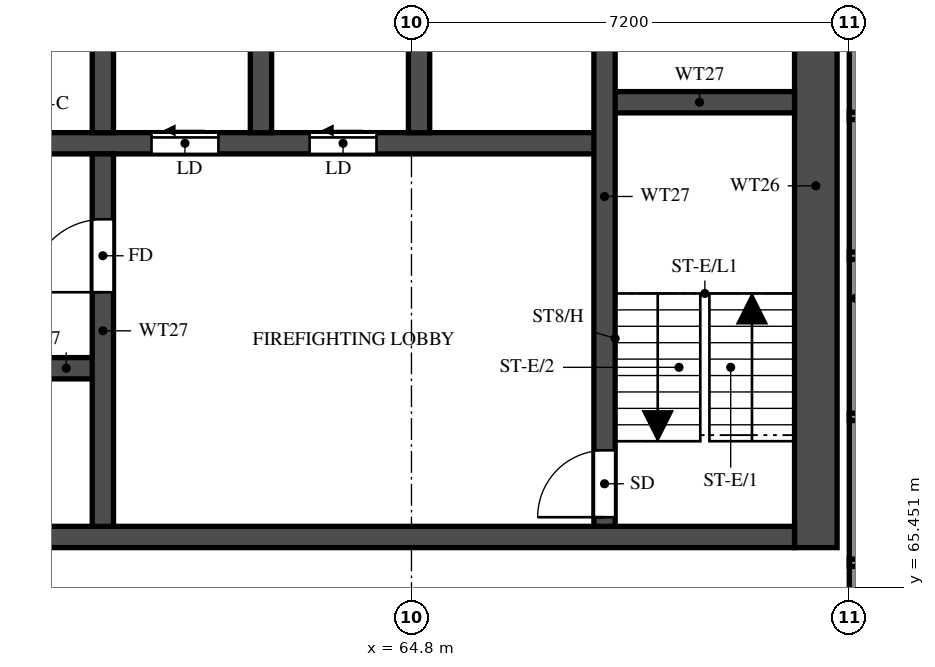
"""IFC4 building model, lengths in metres.
Left out: names, types, materials, properties, quantities, classifications, styles, units other than length and angle.
Written with IfcOpenShell. Run it as: python <this file> out.ifc"""

import sys

from ifc_helpers import new_model, si_unit, direction, frame, frame_2d, origin, place, context, subcontext, project, spatial, rectangle, extrude, element, fill, save


model = new_model("IFC4")
c1 = context("Model", 3, precision=1e-05, world=origin(), true_north=direction((0.0, 1.0)))
c2 = subcontext(c1, "Body", "Model", "MODEL_VIEW")
j1 = project(units=[si_unit("LENGTHUNIT", "METRE"), si_unit("PLANEANGLEUNIT", "RADIAN")], contexts=[c1])
p1 = place(None, origin())
s1 = spatial("IfcSite", under=j1, at=p1, CompositionType="ELEMENT")
p2 = place(p1, origin())
s2 = spatial("IfcBuilding", under=s1, at=p2, CompositionType="ELEMENT")
p3 = place(p2, frame((0.0, 0.0, 146.5)))
s3 = spatial("IfcBuildingStorey", under=s2, at=p3, CompositionType="ELEMENT", Elevation=146.5)
p4 = place(p3, frame((71.45, 66.1, 0.0), z_axis=(0.0, 0.0, 1.0), x_axis=(0.0, 1.0, 0.0)))
e1 = element("IfcWall", 1, at=p4, inside=s3, PredefinedType="SHEAR", context=c2, shape_type="SweptSolid", body=[
    extrude(rectangle(XDim=11.9, YDim=0.7, at=frame_2d((5.95, 0.0))), origin(), (0.0, 0.0, 1.0), 3.2),
])
p5 = place(p3, frame((29.7, 66.275, 0.0), z_axis=(0.0, 0.0, 1.0), x_axis=(1.0, 0.0, 0.0)))
e2 = element("IfcWall", 2, at=p5, inside=s3, PredefinedType="SHEAR", context=c2, shape_type="SweptSolid", body=[
    extrude(rectangle(XDim=41.4, YDim=0.35, at=frame_2d((20.7, 0.0))), origin(), (0.0, 0.0, 1.0), 3.2),
])
p6 = place(p5, frame((0.925, 0.0, 0.0)))
e3 = element("IfcOpeningElement", 3, at=p6, cuts=e2, PredefinedType="OPENING", context=c2, shape_type="SweptSolid", body=[
    extrude(rectangle(XDim=1.1, YDim=2.1, at=frame_2d((0.55, 1.05))), frame((0.0, 0.185, 0.0), z_axis=(0.0, -1.0, 0.0), x_axis=(1.0, 0.0, 0.0)), (0.0, 0.0, 1.0), 0.37),
])
p7 = place(p5, frame((3.712, 0.0, 0.0)))
e4 = element("IfcOpeningElement", 4, at=p7, cuts=e2, PredefinedType="OPENING", context=c2, shape_type="SweptSolid", body=[
    extrude(rectangle(XDim=1.8, YDim=2.1, at=frame_2d((0.9, 1.05))), frame((0.0, 0.185, 0.0), z_axis=(0.0, -1.0, 0.0), x_axis=(1.0, 0.0, 0.0)), (0.0, 0.0, 1.0), 0.37),
])
p8 = place(p3, frame((35.625, 69.05, 0.0), z_axis=(0.0, 0.0, 1.0), x_axis=(1.0, 0.0, 0.0)))
e5 = element("IfcWall", 5, at=p8, inside=s3, PredefinedType="SHEAR", context=c2, shape_type="SweptSolid", body=[
    extrude(rectangle(XDim=24.1, YDim=0.35, at=frame_2d((12.05, 0.0))), origin(), (0.0, 0.0, 1.0), 3.2),
])
p9 = place(p8, frame((1.0, 0.0, 0.0)))
e6 = element("IfcOpeningElement", 6, at=p9, cuts=e5, PredefinedType="OPENING", context=c2, shape_type="SweptSolid", body=[
    extrude(rectangle(XDim=1.1, YDim=2.1, at=frame_2d((0.55, 1.05))), frame((0.0, 0.185, 0.0), z_axis=(0.0, -1.0, 0.0), x_axis=(1.0, 0.0, 0.0)), (0.0, 0.0, 1.0), 0.37),
])
p10 = place(p8, frame((3.75, 0.0, 0.0)))
e7 = element("IfcOpeningElement", 7, at=p10, cuts=e5, PredefinedType="OPENING", context=c2, shape_type="SweptSolid", body=[
    extrude(rectangle(XDim=1.1, YDim=2.1, at=frame_2d((0.55, 1.05))), frame((0.0, 0.185, 0.0), z_axis=(0.0, -1.0, 0.0), x_axis=(1.0, 0.0, 0.0)), (0.0, 0.0, 1.0), 0.37),
])
p11 = place(p8, frame((6.5, 0.0, 0.0)))
e8 = element("IfcOpeningElement", 8, at=p11, cuts=e5, PredefinedType="OPENING", context=c2, shape_type="SweptSolid", body=[
    extrude(rectangle(XDim=1.1, YDim=2.1, at=frame_2d((0.55, 1.05))), frame((0.0, 0.185, 0.0), z_axis=(0.0, -1.0, 0.0), x_axis=(1.0, 0.0, 0.0)), (0.0, 0.0, 1.0), 0.37),
])
p12 = place(p8, frame((9.25, 0.0, 0.0)))
e9 = element("IfcOpeningElement", 9, at=p12, cuts=e5, PredefinedType="OPENING", context=c2, shape_type="SweptSolid", body=[
    extrude(rectangle(XDim=1.1, YDim=2.1, at=frame_2d((0.55, 1.05))), frame((0.0, 0.185, 0.0), z_axis=(0.0, -1.0, 0.0), x_axis=(1.0, 0.0, 0.0)), (0.0, 0.0, 1.0), 0.37),
])
p13 = place(p8, frame((12.0, 0.0, 0.0)))
e10 = element("IfcOpeningElement", 10, at=p13, cuts=e5, PredefinedType="OPENING", context=c2, shape_type="SweptSolid", body=[
    extrude(rectangle(XDim=1.1, YDim=2.1, at=frame_2d((0.55, 1.05))), frame((0.0, 0.185, 0.0), z_axis=(0.0, -1.0, 0.0), x_axis=(1.0, 0.0, 0.0)), (0.0, 0.0, 1.0), 0.37),
])
p14 = place(p8, frame((14.75, 0.0, 0.0)))
e11 = element("IfcOpeningElement", 11, at=p14, cuts=e5, PredefinedType="OPENING", context=c2, shape_type="SweptSolid", body=[
    extrude(rectangle(XDim=1.1, YDim=2.1, at=frame_2d((0.55, 1.05))), frame((0.0, 0.185, 0.0), z_axis=(0.0, -1.0, 0.0), x_axis=(1.0, 0.0, 0.0)), (0.0, 0.0, 1.0), 0.37),
])
p15 = place(p8, frame((17.625, 0.0, 0.0)))
e12 = element("IfcOpeningElement", 12, at=p15, cuts=e5, PredefinedType="OPENING", context=c2, shape_type="SweptSolid", body=[
    extrude(rectangle(XDim=1.1, YDim=2.1, at=frame_2d((0.55, 1.05))), frame((0.0, 0.185, 0.0), z_axis=(0.0, -1.0, 0.0), x_axis=(1.0, 0.0, 0.0)), (0.0, 0.0, 1.0), 0.37),
])
p16 = place(p8, frame((20.625, 0.0, 0.0)))
e13 = element("IfcOpeningElement", 13, at=p16, cuts=e5, PredefinedType="OPENING", context=c2, shape_type="SweptSolid", body=[
    extrude(rectangle(XDim=1.1, YDim=2.1, at=frame_2d((0.55, 1.05))), frame((0.0, 0.185, 0.0), z_axis=(0.0, -1.0, 0.0), x_axis=(1.0, 0.0, 0.0)), (0.0, 0.0, 1.0), 0.37),
])
p17 = place(p3, frame((32.825, 72.75, 0.0), z_axis=(0.0, 0.0, 1.0), x_axis=(1.0, 0.0, 0.0)))
e14 = element("IfcWall", 14, at=p17, inside=s3, PredefinedType="SHEAR", context=c2, shape_type="SweptSolid", body=[
    extrude(rectangle(XDim=35.15, YDim=0.35, at=frame_2d((17.575, 0.0))), origin(), (0.0, 0.0, 1.0), 3.2),
])
p18 = place(p17, frame((19.8, 0.0, 0.0)))
e15 = element("IfcOpeningElement", 15, at=p18, cuts=e14, PredefinedType="OPENING", context=c2, shape_type="SweptSolid", body=[
    extrude(rectangle(XDim=1.1, YDim=2.1, at=frame_2d((0.55, 1.05))), frame((0.0, 0.185, 0.0), z_axis=(0.0, -1.0, 0.0), x_axis=(1.0, 0.0, 0.0)), (0.0, 0.0, 1.0), 0.37),
])
p19 = place(p17, frame((27.7, 0.0, 0.0)))
e16 = element("IfcOpeningElement", 16, at=p19, cuts=e14, PredefinedType="OPENING", context=c2, shape_type="SweptSolid", body=[
    extrude(rectangle(XDim=1.1, YDim=2.1, at=frame_2d((0.55, 1.05))), frame((0.0, 0.185, 0.0), z_axis=(0.0, -1.0, 0.0), x_axis=(1.0, 0.0, 0.0)), (0.0, 0.0, 1.0), 0.37),
])
p20 = place(p17, frame((30.3, 0.0, 0.0)))
e17 = element("IfcOpeningElement", 17, at=p20, cuts=e14, PredefinedType="OPENING", context=c2, shape_type="SweptSolid", body=[
    extrude(rectangle(XDim=1.1, YDim=2.1, at=frame_2d((0.55, 1.05))), frame((0.0, 0.185, 0.0), z_axis=(0.0, -1.0, 0.0), x_axis=(1.0, 0.0, 0.0)), (0.0, 0.0, 1.0), 0.37),
])
p21 = place(p17, frame((3.8, 0.0, 0.0)))
e18 = element("IfcOpeningElement", 18, at=p21, cuts=e14, PredefinedType="OPENING", context=c2, shape_type="SweptSolid", body=[
    extrude(rectangle(XDim=1.1, YDim=2.1, at=frame_2d((0.55, 1.05))), frame((0.0, 0.185, 0.0), z_axis=(0.0, -1.0, 0.0), x_axis=(1.0, 0.0, 0.0)), (0.0, 0.0, 1.0), 0.37),
])
p22 = place(p17, frame((6.55, 0.0, 0.0)))
e19 = element("IfcOpeningElement", 19, at=p22, cuts=e14, PredefinedType="OPENING", context=c2, shape_type="SweptSolid", body=[
    extrude(rectangle(XDim=1.1, YDim=2.1, at=frame_2d((0.55, 1.05))), frame((0.0, 0.185, 0.0), z_axis=(0.0, -1.0, 0.0), x_axis=(1.0, 0.0, 0.0)), (0.0, 0.0, 1.0), 0.37),
])
p23 = place(p17, frame((9.3, 0.0, 0.0)))
e20 = element("IfcOpeningElement", 20, at=p23, cuts=e14, PredefinedType="OPENING", context=c2, shape_type="SweptSolid", body=[
    extrude(rectangle(XDim=1.1, YDim=2.1, at=frame_2d((0.55, 1.05))), frame((0.0, 0.185, 0.0), z_axis=(0.0, -1.0, 0.0), x_axis=(1.0, 0.0, 0.0)), (0.0, 0.0, 1.0), 0.37),
])
p24 = place(p17, frame((12.05, 0.0, 0.0)))
e21 = element("IfcOpeningElement", 21, at=p24, cuts=e14, PredefinedType="OPENING", context=c2, shape_type="SweptSolid", body=[
    extrude(rectangle(XDim=1.1, YDim=2.1, at=frame_2d((0.55, 1.05))), frame((0.0, 0.185, 0.0), z_axis=(0.0, -1.0, 0.0), x_axis=(1.0, 0.0, 0.0)), (0.0, 0.0, 1.0), 0.37),
])
p25 = place(p17, frame((14.8, 0.0, 0.0)))
e22 = element("IfcOpeningElement", 22, at=p25, cuts=e14, PredefinedType="OPENING", context=c2, shape_type="SweptSolid", body=[
    extrude(rectangle(XDim=1.1, YDim=2.1, at=frame_2d((0.55, 1.05))), frame((0.0, 0.185, 0.0), z_axis=(0.0, -1.0, 0.0), x_axis=(1.0, 0.0, 0.0)), (0.0, 0.0, 1.0), 0.37),
])
p26 = place(p17, frame((17.55, 0.0, 0.0)))
e23 = element("IfcOpeningElement", 23, at=p26, cuts=e14, PredefinedType="OPENING", context=c2, shape_type="SweptSolid", body=[
    extrude(rectangle(XDim=1.1, YDim=2.1, at=frame_2d((0.55, 1.05))), frame((0.0, 0.185, 0.0), z_axis=(0.0, -1.0, 0.0), x_axis=(1.0, 0.0, 0.0)), (0.0, 0.0, 1.0), 0.37),
])
p27 = place(p17, frame((0.938, 0.0, 0.0)))
e24 = element("IfcOpeningElement", 24, at=p27, cuts=e14, PredefinedType="OPENING", context=c2, shape_type="SweptSolid", body=[
    extrude(rectangle(XDim=1.1, YDim=2.1, at=frame_2d((0.55, 1.05))), frame((0.0, 0.185, 0.0), z_axis=(0.0, -1.0, 0.0), x_axis=(1.0, 0.0, 0.0)), (0.0, 0.0, 1.0), 0.37),
])
p28 = place(p3, frame((67.975, 73.425, 0.0), z_axis=(0.0, 0.0, 1.0), x_axis=(1.0, 0.0, 0.0)))
e25 = element("IfcWall", 25, at=p28, inside=s3, PredefinedType="SHEAR", context=c2, shape_type="SweptSolid", body=[
    extrude(rectangle(XDim=3.125, YDim=0.35, at=frame_2d((1.562, 0.0))), origin(), (0.0, 0.0, 1.0), 3.2),
])
p29 = place(p3, frame((67.975, 66.45, 0.0), z_axis=(0.0, 0.0, 1.0), x_axis=(0.0, 1.0, 0.0)))
e26 = element("IfcWall", 26, at=p29, inside=s3, PredefinedType="SHEAR", context=c2, shape_type="SweptSolid", body=[
    extrude(rectangle(XDim=10.85, YDim=0.35, at=frame_2d((5.425, 0.0))), origin(), (0.0, 0.0, 1.0), 3.2),
])
p30 = place(p29, frame((0.15, 0.0, 0.0)))
e27 = element("IfcOpeningElement", 27, at=p30, cuts=e26, PredefinedType="OPENING", context=c2, shape_type="SweptSolid", body=[
    extrude(rectangle(XDim=1.1, YDim=2.1, at=frame_2d((0.55, 1.05))), frame((0.0, 0.185, 0.0), z_axis=(0.0, -1.0, 0.0), x_axis=(1.0, 0.0, 0.0)), (0.0, 0.0, 1.0), 0.37),
])
p31 = place(p3, frame((59.725, 66.45, 0.0), z_axis=(0.0, 0.0, 1.0), x_axis=(0.0, 1.0, 0.0)))
e28 = element("IfcWall", 28, at=p31, inside=s3, PredefinedType="SHEAR", context=c2, shape_type="SweptSolid", body=[
    extrude(rectangle(XDim=6.125, YDim=0.35, at=frame_2d((3.062, 0.0))), origin(), (0.0, 0.0, 1.0), 3.2),
])
p32 = place(p31, frame((3.85, 0.0, 0.0)))
e29 = element("IfcOpeningElement", 29, at=p32, cuts=e28, PredefinedType="OPENING", context=c2, shape_type="SweptSolid", body=[
    extrude(rectangle(XDim=1.2, YDim=2.1, at=frame_2d((0.6, 1.05))), frame((0.0, 0.185, 0.0), z_axis=(0.0, -1.0, 0.0), x_axis=(1.0, 0.0, 0.0)), (0.0, 0.0, 1.0), 0.37),
])
for number, where, z_axis, x_axis in (
    (30, (59.725, 72.925, 0.0), (0.0, 0.0, 1.0), (0.0, 1.0, 0.0)),
    (31, (62.325, 72.925, 0.0), (0.0, 0.0, 1.0), (0.0, 1.0, 0.0)),
    (32, (64.925, 72.925, 0.0), (0.0, 0.0, 1.0), (0.0, 1.0, 0.0)),
):
    element("IfcWall", number, at=place(p3, frame(where, z_axis=z_axis, x_axis=x_axis)), inside=s3, PredefinedType="SHEAR", context=c2, shape_type="SweptSolid", body=[
        extrude(rectangle(XDim=2.95, YDim=0.35, at=frame_2d((1.475, 0.0))), origin(), (0.0, 0.0, 1.0), 3.2),
    ])
p33 = place(p3, frame((72.1, 62.4, 0.0), z_axis=(0.0, 0.0, 1.0), x_axis=(0.0, 1.0, 0.0)))
e33 = element("IfcWall", 33, at=p33, inside=s3, PredefinedType="SOLIDWALL", context=c2, shape_type="SweptSolid", body=[
    extrude(rectangle(XDim=15.6, YDim=0.2, at=frame_2d((7.8, 0.0))), origin(), (0.0, 0.0, 1.0), 3.2),
])
for number, where, z_axis, x_axis in (
    (34, (72.0, 65.85, 0.0), (0.0, 0.0, 1.0), (1.0, 0.0, 0.0)),
    (35, (72.0, 68.25, 0.0), (0.0, 0.0, 1.0), (1.0, 0.0, 0.0)),
    (36, (72.0, 70.9, 0.0), (0.0, 0.0, 1.0), (1.0, 0.0, 0.0)),
):
    element("IfcWall", number, at=place(p3, frame(where, z_axis=z_axis, x_axis=x_axis)), inside=s3, PredefinedType="PARTITIONING", context=c2, shape_type="SweptSolid", body=[
        extrude(rectangle(XDim=5.1, YDim=0.12, at=frame_2d((2.55, 0.0))), origin(), (0.0, 0.0, 1.0), 3.2),
    ])
p34 = place(p3, frame((72.0, 73.2, 0.0), z_axis=(0.0, 0.0, 1.0), x_axis=(1.0, 0.0, 0.0)))
e37 = element("IfcWall", 37, at=p34, inside=s3, PredefinedType="PARTITIONING", context=c2, shape_type="SweptSolid", body=[
    extrude(rectangle(XDim=14.275, YDim=0.12, at=frame_2d((7.137, 0.0))), origin(), (0.0, 0.0, 1.0), 2.3),
])
p35 = place(p34, frame((5.7, 0.0, 0.0)))
e38 = element("IfcOpeningElement", 38, at=p35, cuts=e37, PredefinedType="OPENING", context=c2, shape_type="SweptSolid", body=[
    extrude(rectangle(XDim=0.9, YDim=2.1, at=frame_2d((0.45, 1.05))), frame((0.0, 0.07, 0.0), z_axis=(0.0, -1.0, 0.0), x_axis=(1.0, 0.0, 0.0)), (0.0, 0.0, 1.0), 0.14),
])
p36 = place(p30, origin())
e39 = element("IfcDoor", 39, at=p36, inside=s3, OperationType="SINGLE_SWING_LEFT", PredefinedType="DOOR", context=c2, shape_type="SweptSolid", body=[
    extrude(rectangle(XDim=1.1, YDim=2.1, at=frame_2d((0.55, 1.05))), frame((0.0, 0.025, 0.0), z_axis=(0.0, -1.0, 0.0), x_axis=(1.0, 0.0, 0.0)), (0.0, 0.0, 1.0), 0.05),
])
fill(e27, e39)
p37 = place(p32, origin())
e40 = element("IfcDoor", 40, at=p37, inside=s3, OperationType="SINGLE_SWING_LEFT", PredefinedType="DOOR", context=c2, shape_type="SweptSolid", body=[
    extrude(rectangle(XDim=1.2, YDim=2.1, at=frame_2d((0.6, 1.05))), frame((0.0, 0.025, 0.0), z_axis=(0.0, -1.0, 0.0), x_axis=(1.0, 0.0, 0.0)), (0.0, 0.0, 1.0), 0.05),
])
fill(e29, e40)
p38 = place(p19, origin())
e41 = element("IfcDoor", 41, at=p38, inside=s3, OperationType="SLIDING_TO_LEFT", PredefinedType="DOOR", context=c2, shape_type="SweptSolid", body=[
    extrude(rectangle(XDim=1.1, YDim=2.1, at=frame_2d((0.55, 1.05))), frame((0.0, 0.025, 0.0), z_axis=(0.0, -1.0, 0.0), x_axis=(1.0, 0.0, 0.0)), (0.0, 0.0, 1.0), 0.05),
])
fill(e16, e41)
p39 = place(p20, origin())
e42 = element("IfcDoor", 42, at=p39, inside=s3, OperationType="SLIDING_TO_LEFT", PredefinedType="DOOR", context=c2, shape_type="SweptSolid", body=[
    extrude(rectangle(XDim=1.1, YDim=2.1, at=frame_2d((0.55, 1.05))), frame((0.0, 0.025, 0.0), z_axis=(0.0, -1.0, 0.0), x_axis=(1.0, 0.0, 0.0)), (0.0, 0.0, 1.0), 0.05),
])
fill(e17, e42)
save(model, sys.argv[1])
